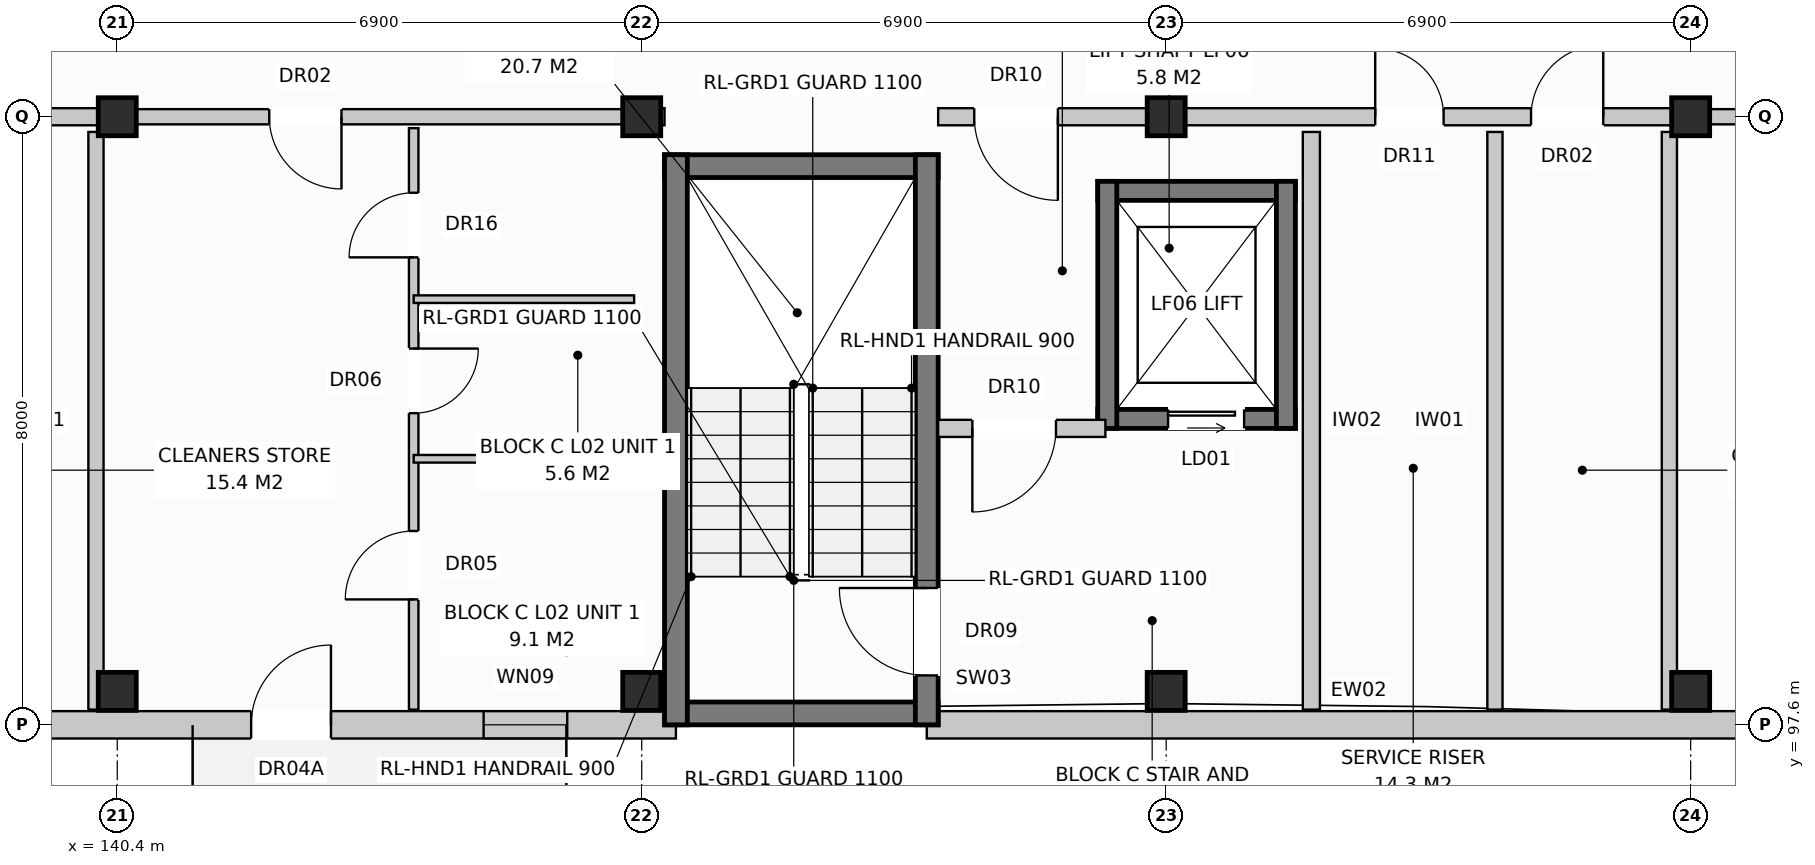
"""IFC4 building model, lengths in metres.
Left out: names, types, materials, properties, quantities, classifications, styles, units other than length and angle.
Written with IfcOpenShell. Run it as: python <this file> out.ifc"""

import sys

from ifc_helpers import new_model, si_unit, direction, frame, frame_2d, origin, origin_with_axes, origin_2d, place, context, subcontext, project, spatial, rectangle, extrude, element, fill, save


model = new_model("IFC4")
c1 = context("Model", 3, precision=1e-05, world=origin(), true_north=direction((0.0, 1.0)))
c2 = subcontext(c1, "Body", "Model", "MODEL_VIEW")
j1 = project(units=[si_unit("LENGTHUNIT", "METRE"), si_unit("PLANEANGLEUNIT", "RADIAN")], contexts=[c1])
p1 = place(None, origin())
s1 = spatial("IfcSite", under=j1, at=p1, CompositionType="ELEMENT")
p2 = place(p1, origin())
s2 = spatial("IfcBuilding", under=s1, at=p2, CompositionType="ELEMENT")
p3 = place(p2, frame((0.0, 0.0, 8.0)))
s3 = spatial("IfcBuildingStorey", under=s2, at=p3, CompositionType="ELEMENT", Elevation=8.0)
for number, where, z_axis, x_axis in (
    (1, (140.4, 98.04, 0.0), (0.0, 0.0, 1.0), (1.0, 0.0, 0.0)),
    (2, (140.4, 105.6, 0.0), (0.0, 0.0, 1.0), (1.0, 0.0, 0.0)),
    (3, (147.3, 98.04, 0.0), (0.0, 0.0, 1.0), (1.0, 0.0, 0.0)),
    (4, (147.3, 105.6, 0.0), (0.0, 0.0, 1.0), (1.0, 0.0, 0.0)),
    (5, (154.2, 98.04, 0.0), (0.0, 0.0, 1.0), (1.0, 0.0, 0.0)),
    (6, (154.2, 105.6, 0.0), (0.0, 0.0, 1.0), (1.0, 0.0, 0.0)),
    (7, (161.1, 98.04, 0.0), (0.0, 0.0, 1.0), (1.0, 0.0, 0.0)),
    (8, (161.1, 105.6, 0.0), (0.0, 0.0, 1.0), (1.0, 0.0, 0.0)),
):
    element("IfcColumn", number, at=place(p3, frame(where, z_axis=z_axis, x_axis=x_axis)), inside=s3, PredefinedType="COLUMN", context=c2, shape_type="SweptSolid", body=[
        extrude(rectangle(XDim=0.5, YDim=0.5, at=origin_2d()), origin(), (0.0, 0.0, 1.0), 3.2),
    ])
p4 = place(p3, frame((130.35, 97.6, 0.0), z_axis=(0.0, 0.0, 1.0), x_axis=(1.0, 0.0, 0.0)))
e9 = element("IfcWall", 9, at=p4, inside=s3, PredefinedType="STANDARD", context=c2, shape_type="SweptSolid", body=[
    extrude(rectangle(XDim=17.4, YDim=0.36, at=frame_2d((8.7, 0.0))), origin(), (0.0, 0.0, 1.0), 2.94),
])
p5 = place(p4, frame((11.812, 0.0, 0.0)))
e10 = element("IfcOpeningElement", 10, at=p5, cuts=e9, PredefinedType="OPENING", context=c2, shape_type="SweptSolid", body=[
    extrude(rectangle(XDim=1.05, YDim=2.12, at=frame_2d((0.525, 1.06))), frame((0.0, 0.192, 0.0), z_axis=(0.0, -1.0, 0.0), x_axis=(1.0, 0.0, 0.0)), (0.0, 0.0, 1.0), 0.384),
])
p6 = place(p4, frame((14.87, 0.0, 0.72)))
e11 = element("IfcOpeningElement", 11, at=p6, cuts=e9, PredefinedType="OPENING", context=c2, shape_type="SweptSolid", body=[
    extrude(rectangle(XDim=1.1, YDim=1.5, at=frame_2d((0.55, 0.75))), frame((0.0, 0.192, 0.0), z_axis=(0.0, -1.0, 0.0), x_axis=(1.0, 0.0, 0.0)), (0.0, 0.0, 1.0), 0.384),
])
p7 = place(p3, frame((151.05, 97.6, 0.0), z_axis=(0.0, 0.0, 1.0), x_axis=(1.0, 0.0, 0.0)))
e12 = element("IfcWall", 12, at=p7, inside=s3, PredefinedType="STANDARD", context=c2, shape_type="SweptSolid", body=[
    extrude(rectangle(XDim=16.78, YDim=0.36, at=frame_2d((8.39, 0.0))), origin(), (0.0, 0.0, 1.0), 2.94),
])
p8 = place(p7, frame((11.12, 0.0, 0.8)))
e13 = element("IfcOpeningElement", 13, at=p8, cuts=e12, PredefinedType="OPENING", context=c2, shape_type="SweptSolid", body=[
    extrude(rectangle(XDim=1.8, YDim=1.7, at=frame_2d((0.9, 0.85))), frame((0.0, 0.192, 0.0), z_axis=(0.0, -1.0, 0.0), x_axis=(1.0, 0.0, 0.0)), (0.0, 0.0, 1.0), 0.384),
])
p9 = place(p7, frame((14.87, 0.0, 0.72)))
e14 = element("IfcOpeningElement", 14, at=p9, cuts=e12, PredefinedType="OPENING", context=c2, shape_type="SweptSolid", body=[
    extrude(rectangle(XDim=1.1, YDim=1.5, at=frame_2d((0.55, 0.75))), frame((0.0, 0.192, 0.0), z_axis=(0.0, -1.0, 0.0), x_axis=(1.0, 0.0, 0.0)), (0.0, 0.0, 1.0), 0.384),
])
p10 = place(p3, frame((140.12, 97.8, 0.0), z_axis=(0.0, 0.0, 1.0), x_axis=(0.0, 1.0, 0.0)))
e15 = element("IfcWall", 15, at=p10, inside=s3, PredefinedType="PARTITIONING", context=c2, shape_type="SweptSolid", body=[
    extrude(rectangle(XDim=7.6, YDim=0.2, at=frame_2d((3.8, 0.0))), origin(), (0.0, 0.0, 1.0), 2.94),
])
p11 = place(p3, frame((130.5, 105.6, 0.0), z_axis=(0.0, 0.0, 1.0), x_axis=(1.0, 0.0, 0.0)))
e16 = element("IfcWall", 16, at=p11, inside=s3, PredefinedType="PARTITIONING", context=c2, shape_type="SweptSolid", body=[
    extrude(rectangle(XDim=9.9, YDim=0.225, at=frame_2d((4.95, 0.0))), origin(), (0.0, 0.0, 1.0), 2.38),
])
p12 = place(p11, frame((0.475, 0.0, 0.0)))
e17 = element("IfcOpeningElement", 17, at=p12, cuts=e16, PredefinedType="OPENING", context=c2, shape_type="SweptSolid", body=[
    extrude(rectangle(XDim=1.1, YDim=2.15, at=frame_2d((0.55, 1.075))), frame((0.0, 0.125, 0.0), z_axis=(0.0, -1.0, 0.0), x_axis=(1.0, 0.0, 0.0)), (0.0, 0.0, 1.0), 0.249),
])
p13 = place(p11, frame((5.75, 0.0, 0.0)))
e18 = element("IfcOpeningElement", 18, at=p13, cuts=e16, PredefinedType="OPENING", context=c2, shape_type="SweptSolid", body=[
    extrude(rectangle(XDim=0.9, YDim=2.1, at=frame_2d((0.45, 1.05))), frame((0.0, 0.125, 0.0), z_axis=(0.0, -1.0, 0.0), x_axis=(1.0, 0.0, 0.0)), (0.0, 0.0, 1.0), 0.249),
])
p14 = place(p11, frame((7.8, 0.0, 0.0)))
e19 = element("IfcOpeningElement", 19, at=p14, cuts=e16, PredefinedType="OPENING", context=c2, shape_type="SweptSolid", body=[
    extrude(rectangle(XDim=0.95, YDim=2.15, at=frame_2d((0.475, 1.075))), frame((0.0, 0.125, 0.0), z_axis=(0.0, -1.0, 0.0), x_axis=(1.0, 0.0, 0.0)), (0.0, 0.0, 1.0), 0.249),
])
for number, where, z_axis, x_axis in (
    (20, (147.6, 97.75, 0.0), (0.0, 0.0, 1.0), (1.0, 0.0, 0.0)),
    (21, (147.6, 104.95, 0.0), (0.0, 0.0, 1.0), (1.0, 0.0, 0.0)),
):
    element("IfcWall", number, at=place(p3, frame(where, z_axis=z_axis, x_axis=x_axis)), inside=s3, PredefinedType="SHEAR", context=c2, shape_type="SweptSolid", body=[
        extrude(rectangle(XDim=3.6, YDim=0.3, at=frame_2d((1.8, 0.0))), origin(), (0.0, 0.0, 1.0), 2.94),
    ])
p15 = place(p3, frame((147.75, 97.6, 0.0), z_axis=(0.0, 0.0, 1.0), x_axis=(0.0, 1.0, 0.0)))
e22 = element("IfcWall", 22, at=p15, inside=s3, PredefinedType="SHEAR", context=c2, shape_type="SweptSolid", body=[
    extrude(rectangle(XDim=7.5, YDim=0.3, at=frame_2d((3.75, 0.0))), origin(), (0.0, 0.0, 1.0), 2.94),
])
p16 = place(p3, frame((151.05, 97.6, 0.0), z_axis=(0.0, 0.0, 1.0), x_axis=(0.0, 1.0, 0.0)))
e23 = element("IfcWall", 23, at=p16, inside=s3, PredefinedType="SHEAR", context=c2, shape_type="SweptSolid", body=[
    extrude(rectangle(XDim=7.5, YDim=0.3, at=frame_2d((3.75, 0.0))), origin(), (0.0, 0.0, 1.0), 2.94),
])
p17 = place(p16, frame((0.65, 0.0, 0.0)))
e24 = element("IfcOpeningElement", 24, at=p17, cuts=e23, PredefinedType="OPENING", context=c2, shape_type="SweptSolid", body=[
    extrude(rectangle(XDim=1.15, YDim=2.15, at=frame_2d((0.575, 1.075))), frame((0.0, 0.162, 0.0), z_axis=(0.0, -1.0, 0.0), x_axis=(1.0, 0.0, 0.0)), (0.0, 0.0, 1.0), 0.324),
])
p18 = place(p3, frame((153.3, 101.625, 0.0), z_axis=(0.0, 0.0, 1.0), x_axis=(1.0, 0.0, 0.0)))
e25 = element("IfcWall", 25, at=p18, inside=s3, PredefinedType="SHEAR", context=c2, shape_type="SweptSolid", body=[
    extrude(rectangle(XDim=2.6, YDim=0.25, at=frame_2d((1.3, 0.0))), origin(), (0.0, 0.0, 1.0), 2.94),
])
p19 = place(p18, frame((0.925, 0.0, 0.0)))
e26 = element("IfcOpeningElement", 26, at=p19, cuts=e25, PredefinedType="OPENING", context=c2, shape_type="SweptSolid", body=[
    extrude(rectangle(XDim=1.0, YDim=2.1, at=frame_2d((0.5, 1.05))), frame((0.0, 0.137, 0.0), z_axis=(0.0, -1.0, 0.0), x_axis=(1.0, 0.0, 0.0)), (0.0, 0.0, 1.0), 0.274),
])
p20 = place(p3, frame((153.3, 104.625, 0.0), z_axis=(0.0, 0.0, 1.0), x_axis=(1.0, 0.0, 0.0)))
e27 = element("IfcWall", 27, at=p20, inside=s3, PredefinedType="SHEAR", context=c2, shape_type="SweptSolid", body=[
    extrude(rectangle(XDim=2.6, YDim=0.25, at=frame_2d((1.3, 0.0))), origin(), (0.0, 0.0, 1.0), 2.94),
])
for number, where, z_axis, x_axis in (
    (28, (153.425, 101.5, 0.0), (0.0, 0.0, 1.0), (0.0, 1.0, 0.0)),
    (29, (155.775, 101.5, 0.0), (0.0, 0.0, 1.0), (0.0, 1.0, 0.0)),
):
    element("IfcWall", number, at=place(p3, frame(where, z_axis=z_axis, x_axis=x_axis)), inside=s3, PredefinedType="SHEAR", context=c2, shape_type="SweptSolid", body=[
        extrude(rectangle(XDim=3.25, YDim=0.25, at=frame_2d((1.625, 0.0))), origin(), (0.0, 0.0, 1.0), 2.94),
    ])
p21 = place(p3, frame((156.11, 97.8, 0.0), z_axis=(0.0, 0.0, 1.0), x_axis=(0.0, 1.0, 0.0)))
e30 = element("IfcWall", 30, at=p21, inside=s3, PredefinedType="PARTITIONING", context=c2, shape_type="SweptSolid", body=[
    extrude(rectangle(XDim=7.6, YDim=0.225, at=frame_2d((3.8, 0.0))), origin(), (0.0, 0.0, 1.0), 2.59),
])
p22 = place(p3, frame((151.2, 101.5, 0.0), z_axis=(0.0, 0.0, 1.0), x_axis=(1.0, 0.0, 0.0)))
e31 = element("IfcWall", 31, at=p22, inside=s3, PredefinedType="PARTITIONING", context=c2, shape_type="SweptSolid", body=[
    extrude(rectangle(XDim=2.2, YDim=0.225, at=frame_2d((1.1, 0.0))), origin(), (0.0, 0.0, 1.0), 2.94),
])
p23 = place(p22, frame((0.45, 0.0, 0.0)))
e32 = element("IfcOpeningElement", 32, at=p23, cuts=e31, PredefinedType="OPENING", context=c2, shape_type="SweptSolid", body=[
    extrude(rectangle(XDim=1.1, YDim=2.15, at=frame_2d((0.55, 1.075))), frame((0.0, 0.125, 0.0), z_axis=(0.0, -1.0, 0.0), x_axis=(1.0, 0.0, 0.0)), (0.0, 0.0, 1.0), 0.249),
])
p24 = place(p3, frame((147.3, 105.6, 0.0), z_axis=(0.0, 0.0, 1.0), x_axis=(1.0, 0.0, 0.0)))
e33 = element("IfcWall", 33, at=p24, inside=s3, PredefinedType="PARTITIONING", context=c2, shape_type="SweptSolid", body=[
    extrude(rectangle(XDim=0.3, YDim=0.225, at=frame_2d((0.15, 0.0))), origin(), (0.0, 0.0, 1.0), 2.94),
])
p25 = place(p3, frame((158.525, 97.8, 0.0), z_axis=(0.0, 0.0, 1.0), x_axis=(0.0, 1.0, 0.0)))
e34 = element("IfcWall", 34, at=p25, inside=s3, PredefinedType="PARTITIONING", context=c2, shape_type="SweptSolid", body=[
    extrude(rectangle(XDim=7.6, YDim=0.2, at=frame_2d((3.8, 0.0))), origin(), (0.0, 0.0, 1.0), 2.94),
])
p26 = place(p3, frame((160.82, 97.8, 0.0), z_axis=(0.0, 0.0, 1.0), x_axis=(0.0, 1.0, 0.0)))
e35 = element("IfcWall", 35, at=p26, inside=s3, PredefinedType="PARTITIONING", context=c2, shape_type="SweptSolid", body=[
    extrude(rectangle(XDim=7.6, YDim=0.2, at=frame_2d((3.8, 0.0))), origin(), (0.0, 0.0, 1.0), 2.38),
])
p27 = place(p3, frame((151.2, 105.6, 0.0), z_axis=(0.0, 0.0, 1.0), x_axis=(1.0, 0.0, 0.0)))
e36 = element("IfcWall", 36, at=p27, inside=s3, PredefinedType="PARTITIONING", context=c2, shape_type="SweptSolid", body=[
    extrude(rectangle(XDim=9.9, YDim=0.225, at=frame_2d((4.95, 0.0))), origin(), (0.0, 0.0, 1.0), 2.38),
])
p28 = place(p27, frame((0.475, 0.0, 0.0)))
e37 = element("IfcOpeningElement", 37, at=p28, cuts=e36, PredefinedType="OPENING", context=c2, shape_type="SweptSolid", body=[
    extrude(rectangle(XDim=1.1, YDim=2.15, at=frame_2d((0.55, 1.075))), frame((0.0, 0.125, 0.0), z_axis=(0.0, -1.0, 0.0), x_axis=(1.0, 0.0, 0.0)), (0.0, 0.0, 1.0), 0.249),
])
p29 = place(p27, frame((5.75, 0.0, 0.0)))
e38 = element("IfcOpeningElement", 38, at=p29, cuts=e36, PredefinedType="OPENING", context=c2, shape_type="SweptSolid", body=[
    extrude(rectangle(XDim=0.9, YDim=2.1, at=frame_2d((0.45, 1.05))), frame((0.0, 0.125, 0.0), z_axis=(0.0, -1.0, 0.0), x_axis=(1.0, 0.0, 0.0)), (0.0, 0.0, 1.0), 0.249),
])
p30 = place(p27, frame((7.8, 0.0, 0.0)))
e39 = element("IfcOpeningElement", 39, at=p30, cuts=e36, PredefinedType="OPENING", context=c2, shape_type="SweptSolid", body=[
    extrude(rectangle(XDim=0.95, YDim=2.15, at=frame_2d((0.475, 1.075))), frame((0.0, 0.125, 0.0), z_axis=(0.0, -1.0, 0.0), x_axis=(1.0, 0.0, 0.0)), (0.0, 0.0, 1.0), 0.249),
])
p31 = place(p3, frame((140.4, 105.6, 0.0), z_axis=(0.0, 0.0, 1.0), x_axis=(1.0, 0.0, 0.0)))
e40 = element("IfcWall", 40, at=p31, inside=s3, PredefinedType="PARTITIONING", context=c2, shape_type="SweptSolid", body=[
    extrude(rectangle(XDim=6.9, YDim=0.2, at=frame_2d((3.45, 0.0))), origin(), (0.0, 0.0, 1.0), 2.38),
])
p32 = place(p31, frame((2.0, 0.0, 0.0)))
e41 = element("IfcOpeningElement", 41, at=p32, cuts=e40, PredefinedType="OPENING", context=c2, shape_type="SweptSolid", body=[
    extrude(rectangle(XDim=0.95, YDim=2.15, at=frame_2d((0.475, 1.075))), frame((0.0, 0.112, 0.0), z_axis=(0.0, -1.0, 0.0), x_axis=(1.0, 0.0, 0.0)), (0.0, 0.0, 1.0), 0.224),
])
p33 = place(p3, frame((144.3, 105.45, 0.0), z_axis=(0.0, 0.0, 1.0), x_axis=(0.0, -1.0, 0.0)))
e42 = element("IfcWall", 42, at=p33, inside=s3, PredefinedType="PARTITIONING", context=c2, shape_type="SweptSolid", body=[
    extrude(rectangle(XDim=7.65, YDim=0.125, at=frame_2d((3.825, 0.0))), origin(), (0.0, 0.0, 1.0), 2.94),
])
p34 = place(p33, frame((0.85, 0.0, 0.0)))
e43 = element("IfcOpeningElement", 43, at=p34, cuts=e42, PredefinedType="OPENING", context=c2, shape_type="SweptSolid", body=[
    extrude(rectangle(XDim=0.85, YDim=2.1, at=frame_2d((0.425, 1.05))), frame((0.0, 0.074, 0.0), z_axis=(0.0, -1.0, 0.0), x_axis=(1.0, 0.0, 0.0)), (0.0, 0.0, 1.0), 0.149),
])
p35 = place(p33, frame((2.9, 0.0, 0.0)))
e44 = element("IfcOpeningElement", 44, at=p35, cuts=e42, PredefinedType="OPENING", context=c2, shape_type="SweptSolid", body=[
    extrude(rectangle(XDim=0.85, YDim=2.05, at=frame_2d((0.425, 1.025))), frame((0.0, 0.074, 0.0), z_axis=(0.0, -1.0, 0.0), x_axis=(1.0, 0.0, 0.0)), (0.0, 0.0, 1.0), 0.149),
])
p36 = place(p33, frame((5.3, 0.0, 0.0)))
e45 = element("IfcOpeningElement", 45, at=p36, cuts=e42, PredefinedType="OPENING", context=c2, shape_type="SweptSolid", body=[
    extrude(rectangle(XDim=0.9, YDim=2.1, at=frame_2d((0.45, 1.05))), frame((0.0, 0.074, 0.0), z_axis=(0.0, -1.0, 0.0), x_axis=(1.0, 0.0, 0.0)), (0.0, 0.0, 1.0), 0.149),
])
for number, where, z_axis, x_axis in (
    (46, (144.3, 103.2, 0.0), (0.0, 0.0, 1.0), (1.0, 0.0, 0.0)),
    (47, (144.3, 101.1, 0.0), (0.0, 0.0, 1.0), (1.0, 0.0, 0.0)),
):
    element("IfcWall", number, at=place(p3, frame(where, z_axis=z_axis, x_axis=x_axis)), inside=s3, PredefinedType="PARTITIONING", context=c2, shape_type="SweptSolid", body=[
        extrude(rectangle(XDim=2.9, YDim=0.1, at=frame_2d((1.45, 0.0))), origin(), (0.0, 0.0, 1.0), 2.94),
    ])
p37 = place(p3, frame((161.1, 105.6, 0.0), z_axis=(0.0, 0.0, 1.0), x_axis=(1.0, 0.0, 0.0)))
e48 = element("IfcWall", 48, at=p37, inside=s3, PredefinedType="PARTITIONING", context=c2, shape_type="SweptSolid", body=[
    extrude(rectangle(XDim=6.9, YDim=0.2, at=frame_2d((3.45, 0.0))), origin(), (0.0, 0.0, 1.0), 2.38),
])
p38 = place(p37, frame((2.0, 0.0, 0.0)))
e49 = element("IfcOpeningElement", 49, at=p38, cuts=e48, PredefinedType="OPENING", context=c2, shape_type="SweptSolid", body=[
    extrude(rectangle(XDim=0.95, YDim=2.15, at=frame_2d((0.475, 1.075))), frame((0.0, 0.112, 0.0), z_axis=(0.0, -1.0, 0.0), x_axis=(1.0, 0.0, 0.0)), (0.0, 0.0, 1.0), 0.224),
])
p39 = place(p5, origin_with_axes())
e50 = element("IfcDoor", 50, at=p39, inside=s3, OperationType="SINGLE_SWING_RIGHT", PredefinedType="DOOR", context=c2, shape_type="SweptSolid", body=[
    extrude(rectangle(XDim=1.05, YDim=2.12, at=frame_2d((0.525, 1.06))), frame((0.0, 0.025, 0.0), z_axis=(0.0, -1.0, 0.0), x_axis=(1.0, 0.0, 0.0)), (0.0, 0.0, 1.0), 0.05),
])
fill(e10, e50)
p40 = place(p6, origin_with_axes())
e51 = element("IfcWindow", 51, at=p40, inside=s3, PartitioningType="SINGLE_PANEL", PredefinedType="WINDOW", context=c2, shape_type="SweptSolid", body=[
    extrude(rectangle(XDim=1.1, YDim=1.5, at=frame_2d((0.55, 0.75))), frame((0.0, 0.03, 0.0), z_axis=(0.0, -1.0, 0.0), x_axis=(1.0, 0.0, 0.0)), (0.0, 0.0, 1.0), 0.06),
])
fill(e11, e51)
p41 = place(p17, origin_with_axes())
e52 = element("IfcDoor", 52, at=p41, inside=s3, OperationType="SINGLE_SWING_RIGHT", PredefinedType="DOOR", context=c2, shape_type="SweptSolid", body=[
    extrude(rectangle(XDim=1.15, YDim=2.15, at=frame_2d((0.575, 1.075))), frame((0.0, 0.025, 0.0), z_axis=(0.0, -1.0, 0.0), x_axis=(1.0, 0.0, 0.0)), (0.0, 0.0, 1.0), 0.05),
])
fill(e24, e52)
p42 = place(p19, origin_with_axes())
e53 = element("IfcDoor", 53, at=p42, inside=s3, OperationType="SLIDING_TO_LEFT", PredefinedType="DOOR", context=c2, shape_type="SweptSolid", body=[
    extrude(rectangle(XDim=1.0, YDim=2.1, at=frame_2d((0.5, 1.05))), frame((0.0, 0.025, 0.0), z_axis=(0.0, -1.0, 0.0), x_axis=(1.0, 0.0, 0.0)), (0.0, 0.0, 1.0), 0.05),
])
fill(e26, e53)
p43 = place(p23, frame((1.1, 0.0, 0.0), z_axis=(0.0, 0.0, 1.0), x_axis=(-1.0, 0.0, 0.0)))
e54 = element("IfcDoor", 54, at=p43, inside=s3, OperationType="SINGLE_SWING_LEFT", PredefinedType="DOOR", context=c2, shape_type="SweptSolid", body=[
    extrude(rectangle(XDim=1.1, YDim=2.15, at=frame_2d((0.55, 1.075))), frame((0.0, 0.025, 0.0), z_axis=(0.0, -1.0, 0.0), x_axis=(1.0, 0.0, 0.0)), (0.0, 0.0, 1.0), 0.05),
])
fill(e32, e54)
p44 = place(p28, frame((1.1, 0.0, 0.0), z_axis=(0.0, 0.0, 1.0), x_axis=(-1.0, 0.0, 0.0)))
e55 = element("IfcDoor", 55, at=p44, inside=s3, OperationType="SINGLE_SWING_RIGHT", PredefinedType="DOOR", context=c2, shape_type="SweptSolid", body=[
    extrude(rectangle(XDim=1.1, YDim=2.15, at=frame_2d((0.55, 1.075))), frame((0.0, 0.025, 0.0), z_axis=(0.0, -1.0, 0.0), x_axis=(1.0, 0.0, 0.0)), (0.0, 0.0, 1.0), 0.05),
])
fill(e37, e55)
p45 = place(p29, origin_with_axes())
e56 = element("IfcDoor", 56, at=p45, inside=s3, OperationType="SINGLE_SWING_LEFT", PredefinedType="DOOR", context=c2, shape_type="SweptSolid", body=[
    extrude(rectangle(XDim=0.9, YDim=2.1, at=frame_2d((0.45, 1.05))), frame((0.0, 0.025, 0.0), z_axis=(0.0, -1.0, 0.0), x_axis=(1.0, 0.0, 0.0)), (0.0, 0.0, 1.0), 0.05),
])
fill(e38, e56)
p46 = place(p30, origin_with_axes())
e57 = element("IfcDoor", 57, at=p46, inside=s3, OperationType="SINGLE_SWING_RIGHT", PredefinedType="DOOR", context=c2, shape_type="SweptSolid", body=[
    extrude(rectangle(XDim=0.95, YDim=2.15, at=frame_2d((0.475, 1.075))), frame((0.0, 0.025, 0.0), z_axis=(0.0, -1.0, 0.0), x_axis=(1.0, 0.0, 0.0)), (0.0, 0.0, 1.0), 0.05),
])
fill(e39, e57)
p47 = place(p32, frame((0.95, 0.0, 0.0), z_axis=(0.0, 0.0, 1.0), x_axis=(-1.0, 0.0, 0.0)))
e58 = element("IfcDoor", 58, at=p47, inside=s3, OperationType="SINGLE_SWING_RIGHT", PredefinedType="DOOR", context=c2, shape_type="SweptSolid", body=[
    extrude(rectangle(XDim=0.95, YDim=2.15, at=frame_2d((0.475, 1.075))), frame((0.0, 0.025, 0.0), z_axis=(0.0, -1.0, 0.0), x_axis=(1.0, 0.0, 0.0)), (0.0, 0.0, 1.0), 0.05),
])
fill(e41, e58)
p48 = place(p34, frame((0.85, 0.0, 0.0), z_axis=(0.0, 0.0, 1.0), x_axis=(-1.0, 0.0, 0.0)))
e59 = element("IfcDoor", 59, at=p48, inside=s3, OperationType="SINGLE_SWING_RIGHT", PredefinedType="DOOR", context=c2, shape_type="SweptSolid", body=[
    extrude(rectangle(XDim=0.85, YDim=2.1, at=frame_2d((0.425, 1.05))), frame((0.0, 0.025, 0.0), z_axis=(0.0, -1.0, 0.0), x_axis=(1.0, 0.0, 0.0)), (0.0, 0.0, 1.0), 0.05),
])
fill(e43, e59)
p49 = place(p35, origin_with_axes())
e60 = element("IfcDoor", 60, at=p49, inside=s3, OperationType="SINGLE_SWING_LEFT", PredefinedType="DOOR", context=c2, shape_type="SweptSolid", body=[
    extrude(rectangle(XDim=0.85, YDim=2.05, at=frame_2d((0.425, 1.025))), frame((0.0, 0.025, 0.0), z_axis=(0.0, -1.0, 0.0), x_axis=(1.0, 0.0, 0.0)), (0.0, 0.0, 1.0), 0.05),
])
fill(e44, e60)
p50 = place(p36, frame((0.9, 0.0, 0.0), z_axis=(0.0, 0.0, 1.0), x_axis=(-1.0, 0.0, 0.0)))
e61 = element("IfcDoor", 61, at=p50, inside=s3, OperationType="SINGLE_SWING_RIGHT", PredefinedType="DOOR", context=c2, shape_type="SweptSolid", body=[
    extrude(rectangle(XDim=0.9, YDim=2.1, at=frame_2d((0.45, 1.05))), frame((0.0, 0.025, 0.0), z_axis=(0.0, -1.0, 0.0), x_axis=(1.0, 0.0, 0.0)), (0.0, 0.0, 1.0), 0.05),
])
fill(e45, e61)
save(model, sys.argv[1])
